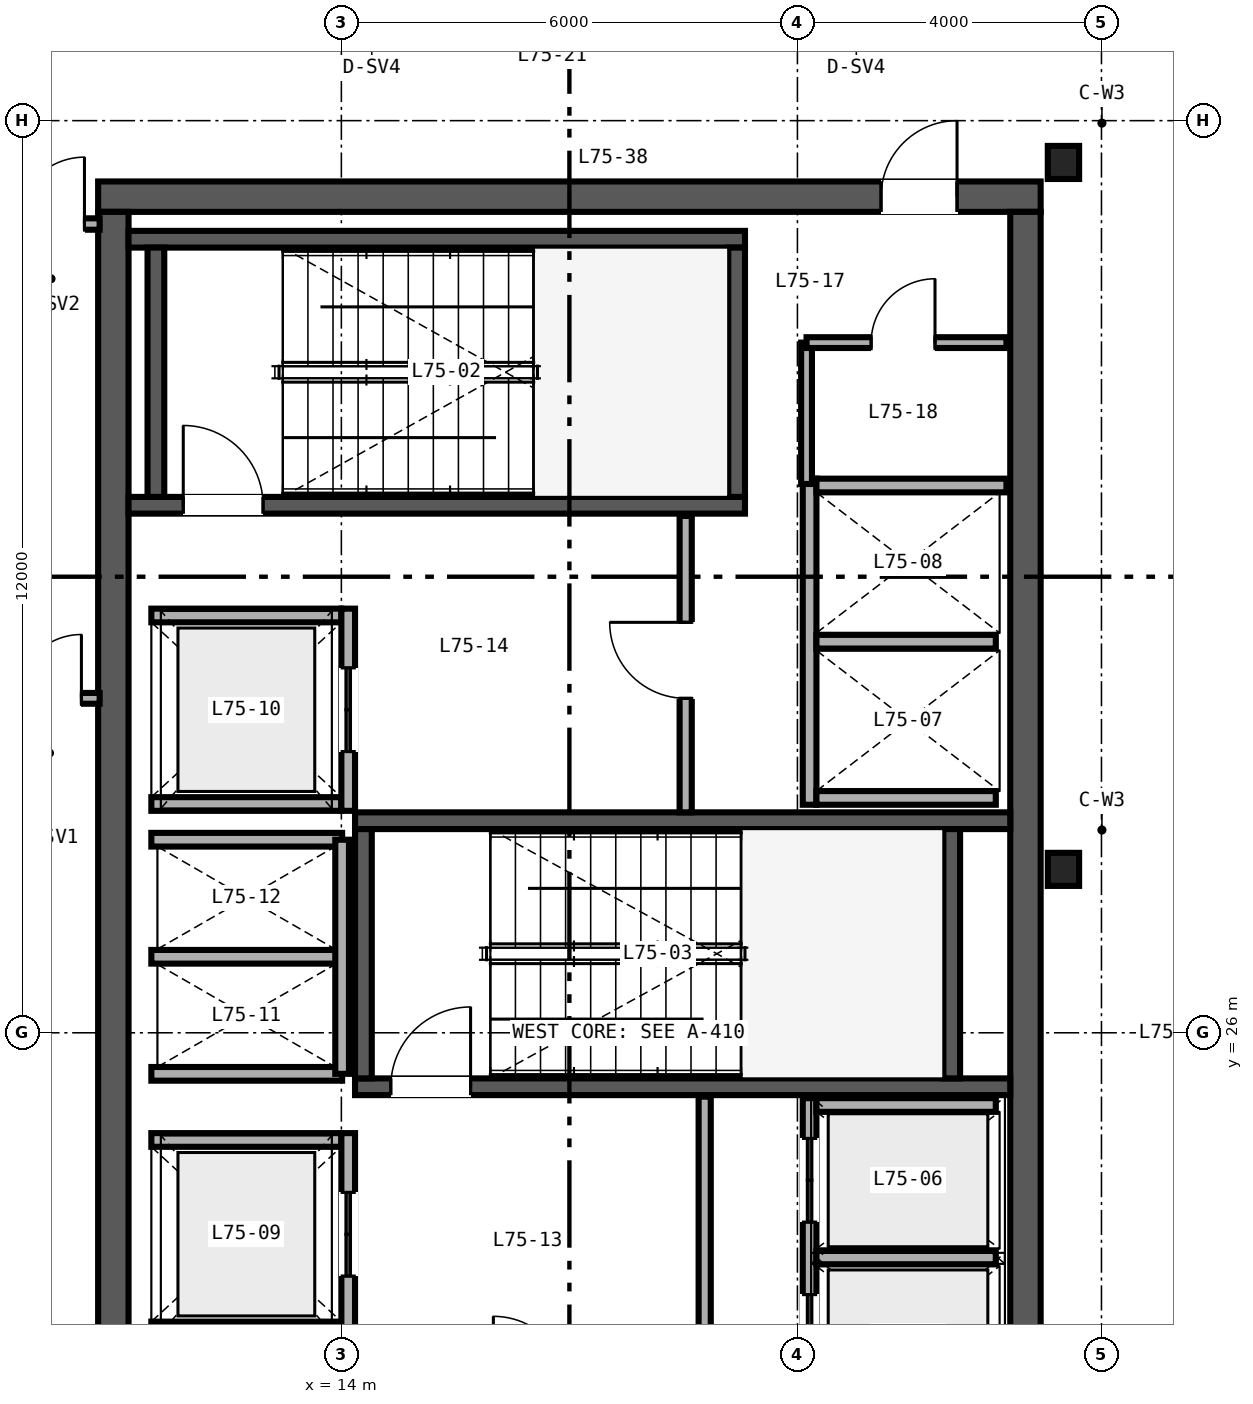
"""IFC4 building model, lengths in metres.
Left out: names, types, materials, properties, quantities, classifications, styles, units other than length and angle.
Written with IfcOpenShell. Run it as: python <this file> out.ifc"""

import sys

from ifc_helpers import new_model, si_unit, direction, frame, frame_2d, origin, origin_2d, place, context, subcontext, project, spatial, rectangle, i_section, extrude, source, transform, mapped, element, fill, save


model = new_model("IFC4")
c1 = context("Model", 3, precision=1e-05, world=origin(), true_north=direction((0.0, 1.0)))
c2 = subcontext(c1, "Body", "Model", "MODEL_VIEW")
j1 = project(units=[si_unit("LENGTHUNIT", "METRE"), si_unit("PLANEANGLEUNIT", "RADIAN")], contexts=[c1])
p1 = place(None, origin())
s1 = spatial("IfcSite", under=j1, at=p1, CompositionType="ELEMENT")
p2 = place(p1, origin())
s2 = spatial("IfcBuilding", under=s1, at=p2, CompositionType="ELEMENT")
p3 = place(p2, frame((0.0, 0.0, 294.0)))
s3 = spatial("IfcBuildingStorey", under=s2, at=p3, CompositionType="ELEMENT", Elevation=294.0)
p4 = place(p3, frame((10.8, 37.0, 0.0), z_axis=(0.0, 0.0, 1.0), x_axis=(1.0, 0.0, 0.0)))
e1 = element("IfcWall", 1, at=p4, inside=s3, PredefinedType="SHEAR", context=c2, shape_type="SweptSolid", body=[
    extrude(rectangle(XDim=12.4, YDim=0.4, at=frame_2d((6.2, 0.0))), origin(), (0.0, 0.0, 1.0), 3.38),
])
p5 = place(p4, frame((10.3, 0.0, 0.0)))
e2 = element("IfcOpeningElement", 2, at=p5, cuts=e1, PredefinedType="OPENING", context=c2, shape_type="SweptSolid", body=[
    extrude(rectangle(XDim=1.0, YDim=2.15, at=frame_2d((0.5, 1.075))), frame((0.0, 0.21, 0.0), z_axis=(0.0, -1.0, 0.0), x_axis=(1.0, 0.0, 0.0)), (0.0, 0.0, 1.0), 0.42),
])
for number, where, z_axis, x_axis in (
    (3, (11.0, 15.2, 0.0), (0.0, 0.0, 1.0), (0.0, 1.0, 0.0)),
    (4, (23.0, 15.2, 0.0), (0.0, 0.0, 1.0), (0.0, 1.0, 0.0)),
):
    element("IfcWall", number, at=place(p3, frame(where, z_axis=z_axis, x_axis=x_axis)), inside=s3, PredefinedType="SHEAR", context=c2, shape_type="SweptSolid", body=[
        extrude(rectangle(XDim=21.6, YDim=0.4, at=frame_2d((10.8, 0.0))), origin(), (0.0, 0.0, 1.0), 3.38),
    ])
p6 = place(p3, frame((11.2, 32.94, 0.0), z_axis=(0.0, 0.0, 1.0), x_axis=(1.0, 0.0, 0.0)))
e5 = element("IfcWall", 5, at=p6, inside=s3, PredefinedType="SHEAR", context=c2, shape_type="SweptSolid", body=[
    extrude(rectangle(XDim=8.11, YDim=0.22, at=frame_2d((4.055, 0.0))), origin(), (0.0, 0.0, 1.0), 3.4),
])
p7 = place(p6, frame((0.72, 0.0, 0.0)))
e6 = element("IfcOpeningElement", 6, at=p7, cuts=e5, PredefinedType="OPENING", context=c2, shape_type="SweptSolid", body=[
    extrude(rectangle(XDim=1.05, YDim=2.15, at=frame_2d((0.525, 1.075))), frame((0.0, 0.12, 0.0), z_axis=(0.0, -1.0, 0.0), x_axis=(1.0, 0.0, 0.0)), (0.0, 0.0, 1.0), 0.24),
])
p8 = place(p3, frame((11.2, 36.44, 0.0), z_axis=(0.0, 0.0, 1.0), x_axis=(1.0, 0.0, 0.0)))
e7 = element("IfcWall", 7, at=p8, inside=s3, PredefinedType="SHEAR", context=c2, shape_type="SweptSolid", body=[
    extrude(rectangle(XDim=8.11, YDim=0.22, at=frame_2d((4.055, 0.0))), origin(), (0.0, 0.0, 1.0), 3.4),
])
for number, where, z_axis, x_axis in (
    (8, (11.56, 33.05, 0.0), (0.0, 0.0, 1.0), (0.0, 1.0, 0.0)),
    (9, (19.2, 33.05, 0.0), (0.0, 0.0, 1.0), (0.0, 1.0, 0.0)),
):
    element("IfcWall", number, at=place(p3, frame(where, z_axis=z_axis, x_axis=x_axis)), inside=s3, PredefinedType="SHEAR", context=c2, shape_type="SweptSolid", body=[
        extrude(rectangle(XDim=3.28, YDim=0.22, at=frame_2d((1.64, 0.0))), origin(), (0.0, 0.0, 1.0), 3.4),
    ])
p9 = place(p3, frame((14.18, 25.29, 0.0), z_axis=(0.0, 0.0, 1.0), x_axis=(1.0, 0.0, 0.0)))
e10 = element("IfcWall", 10, at=p9, inside=s3, PredefinedType="SHEAR", context=c2, shape_type="SweptSolid", body=[
    extrude(rectangle(XDim=8.62, YDim=0.22, at=frame_2d((4.31, 0.0))), origin(), (0.0, 0.0, 1.0), 3.4),
])
p10 = place(p9, frame((0.47, 0.0, 0.0)))
e11 = element("IfcOpeningElement", 11, at=p10, cuts=e10, PredefinedType="OPENING", context=c2, shape_type="SweptSolid", body=[
    extrude(rectangle(XDim=1.05, YDim=2.15, at=frame_2d((0.525, 1.075))), frame((0.0, 0.12, 0.0), z_axis=(0.0, -1.0, 0.0), x_axis=(1.0, 0.0, 0.0)), (0.0, 0.0, 1.0), 0.24),
])
p11 = place(p3, frame((14.18, 28.79, 0.0), z_axis=(0.0, 0.0, 1.0), x_axis=(1.0, 0.0, 0.0)))
e12 = element("IfcWall", 12, at=p11, inside=s3, PredefinedType="SHEAR", context=c2, shape_type="SweptSolid", body=[
    extrude(rectangle(XDim=8.62, YDim=0.22, at=frame_2d((4.31, 0.0))), origin(), (0.0, 0.0, 1.0), 3.4),
])
for number, where, z_axis, x_axis in (
    (13, (14.29, 25.4, 0.0), (0.0, 0.0, 1.0), (0.0, 1.0, 0.0)),
    (14, (22.03, 25.4, 0.0), (0.0, 0.0, 1.0), (0.0, 1.0, 0.0)),
):
    element("IfcWall", number, at=place(p3, frame(where, z_axis=z_axis, x_axis=x_axis)), inside=s3, PredefinedType="SHEAR", context=c2, shape_type="SweptSolid", body=[
        extrude(rectangle(XDim=3.28, YDim=0.22, at=frame_2d((1.64, 0.0))), origin(), (0.0, 0.0, 1.0), 3.4),
    ])
m1 = source(origin(), c2, "Body", "SweptSolid", [
    extrude(i_section(OverallWidth=0.412, OverallDepth=0.435, WebThickness=0.036, FlangeThickness=0.057, FilletRadius=0.025, at=origin_2d()), origin(), (0.0, 0.0, 1.0), 3.38),
])
for number, where, z_axis, x_axis in (
    (15, (23.5, 28.15, 0.0), (0.0, 0.0, 1.0), (1.0, 0.0, 0.0)),
    (16, (23.5, 37.45, 0.0), (0.0, 0.0, 1.0), (1.0, 0.0, 0.0)),
):
    element("IfcColumn", number, at=place(p3, frame(where, z_axis=z_axis, x_axis=x_axis)), inside=s3, PredefinedType="COLUMN", context=c2, shape_type="MappedRepresentation", body=[
        mapped(m1, transform((0.0, 0.0, 0.0), scale=1.0)),
    ])
p12 = place(p3, frame((20.16, 18.82, 0.0), z_axis=(0.0, 0.0, 1.0), x_axis=(0.0, 1.0, 0.0)))
e17 = element("IfcWall", 17, at=p12, inside=s3, PredefinedType="SOLIDWALL", context=c2, shape_type="SweptSolid", body=[
    extrude(rectangle(XDim=6.32, YDim=0.18, at=frame_2d((3.16, 0.0))), origin(), (0.0, 0.0, 1.0), 2.48),
])
p13 = place(p12, frame((0.555, 0.0, 0.0)))
e18 = element("IfcOpeningElement", 18, at=p13, cuts=e17, PredefinedType="OPENING", context=c2, shape_type="SweptSolid", body=[
    extrude(rectangle(XDim=1.1, YDim=2.2, at=frame_2d((0.55, 1.1))), frame((0.0, 0.1, 0.0), z_axis=(0.0, -1.0, 0.0), x_axis=(1.0, 0.0, 0.0)), (0.0, 0.0, 1.0), 0.2),
])
p14 = place(p12, frame((2.635, 0.0, 0.0)))
e19 = element("IfcOpeningElement", 19, at=p14, cuts=e17, PredefinedType="OPENING", context=c2, shape_type="SweptSolid", body=[
    extrude(rectangle(XDim=1.1, YDim=2.2, at=frame_2d((0.55, 1.1))), frame((0.0, 0.1, 0.0), z_axis=(0.0, -1.0, 0.0), x_axis=(1.0, 0.0, 0.0)), (0.0, 0.0, 1.0), 0.2),
])
p15 = place(p12, frame((4.69, 0.0, 0.0)))
e20 = element("IfcOpeningElement", 20, at=p15, cuts=e17, PredefinedType="OPENING", context=c2, shape_type="SweptSolid", body=[
    extrude(rectangle(XDim=1.1, YDim=2.2, at=frame_2d((0.55, 1.1))), frame((0.0, 0.1, 0.0), z_axis=(0.0, -1.0, 0.0), x_axis=(1.0, 0.0, 0.0)), (0.0, 0.0, 1.0), 0.2),
])
for number, where, z_axis, x_axis in (
    (21, (20.25, 25.05, 0.0), (0.0, 0.0, 1.0), (1.0, 0.0, 0.0)),
    (22, (20.25, 23.045, 0.0), (0.0, 0.0, 1.0), (1.0, 0.0, 0.0)),
):
    element("IfcWall", number, at=place(p3, frame(where, z_axis=z_axis, x_axis=x_axis)), inside=s3, PredefinedType="SOLIDWALL", context=c2, shape_type="SweptSolid", body=[
        extrude(rectangle(XDim=2.36, YDim=0.18, at=frame_2d((1.18, 0.0))), origin(), (0.0, 0.0, 1.0), 3.38),
    ])
p16 = place(p3, frame((20.16, 29.0, 0.0), z_axis=(0.0, 0.0, 1.0), x_axis=(0.0, 1.0, 0.0)))
e23 = element("IfcWall", 23, at=p16, inside=s3, PredefinedType="SOLIDWALL", context=c2, shape_type="SweptSolid", body=[
    extrude(rectangle(XDim=4.29, YDim=0.18, at=frame_2d((2.145, 0.0))), origin(), (0.0, 0.0, 1.0), 3.38),
])
p17 = place(p3, frame((20.25, 29.09, 0.0), z_axis=(0.0, 0.0, 1.0), x_axis=(1.0, 0.0, 0.0)))
e24 = element("IfcWall", 24, at=p17, inside=s3, PredefinedType="SOLIDWALL", context=c2, shape_type="SweptSolid", body=[
    extrude(rectangle(XDim=2.36, YDim=0.18, at=frame_2d((1.18, 0.0))), origin(), (0.0, 0.0, 1.0), 3.38),
])
p18 = place(p3, frame((20.25, 33.2, 0.0), z_axis=(0.0, 0.0, 1.0), x_axis=(1.0, 0.0, 0.0)))
e25 = element("IfcWall", 25, at=p18, inside=s3, PredefinedType="SOLIDWALL", context=c2, shape_type="SweptSolid", body=[
    extrude(rectangle(XDim=2.5, YDim=0.18, at=frame_2d((1.25, 0.0))), origin(), (0.0, 0.0, 1.0), 3.38),
])
p19 = place(p3, frame((20.25, 31.145, 0.0), z_axis=(0.0, 0.0, 1.0), x_axis=(1.0, 0.0, 0.0)))
e26 = element("IfcWall", 26, at=p19, inside=s3, PredefinedType="SOLIDWALL", context=c2, shape_type="SweptSolid", body=[
    extrude(rectangle(XDim=2.36, YDim=0.18, at=frame_2d((1.18, 0.0))), origin(), (0.0, 0.0, 1.0), 3.38),
])
for number, where, z_axis, x_axis in (
    (27, (11.5, 22.11, 0.0), (0.0, 0.0, 1.0), (1.0, 0.0, 0.0)),
    (28, (11.5, 24.59, 0.0), (0.0, 0.0, 1.0), (1.0, 0.0, 0.0)),
):
    element("IfcWall", number, at=place(p3, frame(where, z_axis=z_axis, x_axis=x_axis)), inside=s3, PredefinedType="SOLIDWALL", context=c2, shape_type="SweptSolid", body=[
        extrude(rectangle(XDim=2.5, YDim=0.18, at=frame_2d((1.25, 0.0))), origin(), (0.0, 0.0, 1.0), 3.38),
    ])
p20 = place(p3, frame((14.09, 22.02, 0.0), z_axis=(0.0, 0.0, 1.0), x_axis=(0.0, 1.0, 0.0)))
e29 = element("IfcWall", 29, at=p20, inside=s3, PredefinedType="SOLIDWALL", context=c2, shape_type="SweptSolid", body=[
    extrude(rectangle(XDim=2.66, YDim=0.18, at=frame_2d((1.33, 0.0))), origin(), (0.0, 0.0, 1.0), 3.38),
])
p21 = place(p20, frame((0.78, 0.0, 0.0)))
e30 = element("IfcOpeningElement", 30, at=p21, cuts=e29, PredefinedType="OPENING", context=c2, shape_type="SweptSolid", body=[
    extrude(rectangle(XDim=1.1, YDim=2.2, at=frame_2d((0.55, 1.1))), frame((0.0, 0.1, 0.0), z_axis=(0.0, -1.0, 0.0), x_axis=(1.0, 0.0, 0.0)), (0.0, 0.0, 1.0), 0.2),
])
for number, where, z_axis, x_axis in (
    (31, (11.5, 29.01, 0.0), (0.0, 0.0, 1.0), (1.0, 0.0, 0.0)),
    (32, (11.5, 31.49, 0.0), (0.0, 0.0, 1.0), (1.0, 0.0, 0.0)),
):
    element("IfcWall", number, at=place(p3, frame(where, z_axis=z_axis, x_axis=x_axis)), inside=s3, PredefinedType="SOLIDWALL", context=c2, shape_type="SweptSolid", body=[
        extrude(rectangle(XDim=2.5, YDim=0.18, at=frame_2d((1.25, 0.0))), origin(), (0.0, 0.0, 1.0), 3.38),
    ])
p22 = place(p3, frame((14.09, 28.92, 0.0), z_axis=(0.0, 0.0, 1.0), x_axis=(0.0, 1.0, 0.0)))
e33 = element("IfcWall", 33, at=p22, inside=s3, PredefinedType="SOLIDWALL", context=c2, shape_type="SweptSolid", body=[
    extrude(rectangle(XDim=2.66, YDim=0.18, at=frame_2d((1.33, 0.0))), origin(), (0.0, 0.0, 1.0), 3.38),
])
p23 = place(p22, frame((0.78, 0.0, 0.0)))
e34 = element("IfcOpeningElement", 34, at=p23, cuts=e33, PredefinedType="OPENING", context=c2, shape_type="SweptSolid", body=[
    extrude(rectangle(XDim=1.1, YDim=2.2, at=frame_2d((0.55, 1.1))), frame((0.0, 0.1, 0.0), z_axis=(0.0, -1.0, 0.0), x_axis=(1.0, 0.0, 0.0)), (0.0, 0.0, 1.0), 0.2),
])
for number, where, z_axis, x_axis in (
    (35, (11.5, 25.46, 0.0), (0.0, 0.0, 1.0), (1.0, 0.0, 0.0)),
    (36, (11.5, 27.0, 0.0), (0.0, 0.0, 1.0), (1.0, 0.0, 0.0)),
    (37, (11.5, 28.54, 0.0), (0.0, 0.0, 1.0), (1.0, 0.0, 0.0)),
):
    element("IfcWall", number, at=place(p3, frame(where, z_axis=z_axis, x_axis=x_axis)), inside=s3, PredefinedType="SOLIDWALL", context=c2, shape_type="SweptSolid", body=[
        extrude(rectangle(XDim=2.51, YDim=0.18, at=frame_2d((1.255, 0.0))), origin(), (0.0, 0.0, 1.0), 3.38),
    ])
p24 = place(p3, frame((14.01, 25.46, 0.0), z_axis=(0.0, 0.0, 1.0), x_axis=(0.0, 1.0, 0.0)))
e38 = element("IfcWall", 38, at=p24, inside=s3, PredefinedType="SOLIDWALL", context=c2, shape_type="SweptSolid", body=[
    extrude(rectangle(XDim=3.08, YDim=0.18, at=frame_2d((1.54, 0.0))), origin(), (0.0, 0.0, 1.0), 3.38),
])
p25 = place(p3, frame((18.78, 21.35, 0.0), z_axis=(0.0, 0.0, 1.0), x_axis=(0.0, 1.0, 0.0)))
e39 = element("IfcWall", 39, at=p25, inside=s3, PredefinedType="PARTITIONING", context=c2, shape_type="SweptSolid", body=[
    extrude(rectangle(XDim=3.81, YDim=0.16, at=frame_2d((1.905, 0.0))), origin(), (0.0, 0.0, 1.0), 3.38),
])
p26 = place(p3, frame((18.53, 28.9, 0.0), z_axis=(0.0, 0.0, 1.0), x_axis=(0.0, 1.0, 0.0)))
e40 = element("IfcWall", 40, at=p26, inside=s3, PredefinedType="PARTITIONING", context=c2, shape_type="SweptSolid", body=[
    extrude(rectangle(XDim=3.9, YDim=0.16, at=frame_2d((1.95, 0.0))), origin(), (0.0, 0.0, 1.0), 3.38),
])
p27 = place(p26, frame((1.5, 0.0, 0.0)))
e41 = element("IfcOpeningElement", 41, at=p27, cuts=e40, PredefinedType="OPENING", context=c2, shape_type="SweptSolid", body=[
    extrude(rectangle(XDim=1.0, YDim=2.15, at=frame_2d((0.5, 1.075))), frame((0.0, 0.09, 0.0), z_axis=(0.0, -1.0, 0.0), x_axis=(1.0, 0.0, 0.0)), (0.0, 0.0, 1.0), 0.18),
])
p28 = place(p3, frame((20.12, 33.22, 0.0), z_axis=(0.0, 0.0, 1.0), x_axis=(0.0, 1.0, 0.0)))
e42 = element("IfcWall", 42, at=p28, inside=s3, PredefinedType="PARTITIONING", context=c2, shape_type="SweptSolid", body=[
    extrude(rectangle(XDim=1.86, YDim=0.142, at=frame_2d((0.93, 0.0))), origin(), (0.0, 0.0, 1.0), 3.38),
])
p29 = place(p3, frame((20.12, 35.08, 0.0), z_axis=(0.0, 0.0, 1.0), x_axis=(1.0, 0.0, 0.0)))
e43 = element("IfcWall", 43, at=p29, inside=s3, PredefinedType="PARTITIONING", context=c2, shape_type="SweptSolid", body=[
    extrude(rectangle(XDim=2.63, YDim=0.142, at=frame_2d((1.315, 0.0))), origin(), (0.0, 0.0, 1.0), 3.38),
])
p30 = place(p29, frame((0.85, 0.0, 0.0)))
e44 = element("IfcOpeningElement", 44, at=p30, cuts=e43, PredefinedType="OPENING", context=c2, shape_type="SweptSolid", body=[
    extrude(rectangle(XDim=0.84, YDim=2.1, at=frame_2d((0.42, 1.05))), frame((0.0, 0.081, 0.0), z_axis=(0.0, -1.0, 0.0), x_axis=(1.0, 0.0, 0.0)), (0.0, 0.0, 1.0), 0.162),
])
p31 = place(p3, frame((8.16, 36.64, 0.0), z_axis=(0.0, 0.0, 1.0), x_axis=(1.0, 0.0, 0.0)))
e45 = element("IfcWall", 45, at=p31, inside=s3, PredefinedType="PARTITIONING", context=c2, shape_type="SweptSolid", body=[
    extrude(rectangle(XDim=2.66, YDim=0.15, at=frame_2d((1.33, 0.0))), origin(), (0.0, 0.0, 1.0), 2.763),
])
p32 = place(p31, frame((1.58, 0.0, 0.0)))
e46 = element("IfcOpeningElement", 46, at=p32, cuts=e45, PredefinedType="OPENING", context=c2, shape_type="SweptSolid", body=[
    extrude(rectangle(XDim=0.88, YDim=2.15, at=frame_2d((0.44, 1.075))), frame((0.0, 0.085, 0.0), z_axis=(0.0, -1.0, 0.0), x_axis=(1.0, 0.0, 0.0)), (0.0, 0.0, 1.0), 0.17),
])
p33 = place(p3, frame((8.16, 30.4, 0.0), z_axis=(0.0, 0.0, 1.0), x_axis=(1.0, 0.0, 0.0)))
e47 = element("IfcWall", 47, at=p33, inside=s3, PredefinedType="PARTITIONING", context=c2, shape_type="SweptSolid", body=[
    extrude(rectangle(XDim=2.66, YDim=0.142, at=frame_2d((1.33, 0.0))), origin(), (0.0, 0.0, 1.0), 2.763),
])
p34 = place(p33, frame((1.58, 0.0, 0.0)))
e48 = element("IfcOpeningElement", 48, at=p34, cuts=e47, PredefinedType="OPENING", context=c2, shape_type="SweptSolid", body=[
    extrude(rectangle(XDim=0.84, YDim=2.1, at=frame_2d((0.42, 1.05))), frame((0.0, 0.081, 0.0), z_axis=(0.0, -1.0, 0.0), x_axis=(1.0, 0.0, 0.0)), (0.0, 0.0, 1.0), 0.162),
])
m2 = source(origin(), c2, "Body", "SweptSolid", [
    extrude(rectangle(XDim=1.05, YDim=2.15, at=frame_2d((0.525, 1.075))), frame((0.0, 0.025, 0.0), z_axis=(0.0, -1.0, 0.0), x_axis=(1.0, 0.0, 0.0)), (0.0, 0.0, 1.0), 0.05),
])
p35 = place(p7, origin())
e49 = element("IfcDoor", 49, at=p35, inside=s3, OperationType="SINGLE_SWING_LEFT", PredefinedType="DOOR", context=c2, shape_type="MappedRepresentation", body=[
    mapped(m2, transform((0.0, 0.0, 0.0), scale=1.0)),
])
fill(e6, e49)
p36 = place(p10, origin())
e50 = element("IfcDoor", 50, at=p36, inside=s3, OperationType="SINGLE_SWING_RIGHT", PredefinedType="DOOR", context=c2, shape_type="MappedRepresentation", body=[
    mapped(m2, transform((0.0, 0.0, 0.0), scale=1.0)),
])
fill(e11, e50)
m3 = source(origin(), c2, "Body", "SweptSolid", [
    extrude(rectangle(XDim=1.1, YDim=2.2, at=frame_2d((0.55, 1.1))), frame((0.0, 0.025, 0.0), z_axis=(0.0, -1.0, 0.0), x_axis=(1.0, 0.0, 0.0)), (0.0, 0.0, 1.0), 0.05),
])
p37 = place(p14, origin())
e51 = element("IfcDoor", 51, at=p37, inside=s3, OperationType="DOUBLE_DOOR_SLIDING", PredefinedType="DOOR", context=c2, shape_type="MappedRepresentation", body=[
    mapped(m3, transform((0.0, 0.0, 0.0), scale=1.0)),
])
fill(e19, e51)
p38 = place(p15, origin())
e52 = element("IfcDoor", 52, at=p38, inside=s3, OperationType="DOUBLE_DOOR_SLIDING", PredefinedType="DOOR", context=c2, shape_type="MappedRepresentation", body=[
    mapped(m3, transform((0.0, 0.0, 0.0), scale=1.0)),
])
fill(e20, e52)
p39 = place(p21, origin())
e53 = element("IfcDoor", 53, at=p39, inside=s3, OperationType="DOUBLE_DOOR_SLIDING", PredefinedType="DOOR", context=c2, shape_type="MappedRepresentation", body=[
    mapped(m3, transform((0.0, 0.0, 0.0), scale=1.0)),
])
fill(e30, e53)
p40 = place(p23, origin())
e54 = element("IfcDoor", 54, at=p40, inside=s3, OperationType="DOUBLE_DOOR_SLIDING", PredefinedType="DOOR", context=c2, shape_type="MappedRepresentation", body=[
    mapped(m3, transform((0.0, 0.0, 0.0), scale=1.0)),
])
fill(e34, e54)
m4 = source(origin(), c2, "Body", "SweptSolid", [
    extrude(rectangle(XDim=1.0, YDim=2.15, at=frame_2d((0.5, 1.075))), frame((0.0, 0.025, 0.0), z_axis=(0.0, -1.0, 0.0), x_axis=(1.0, 0.0, 0.0)), (0.0, 0.0, 1.0), 0.05),
])
p41 = place(p27, origin())
e55 = element("IfcDoor", 55, at=p41, inside=s3, OperationType="SINGLE_SWING_RIGHT", PredefinedType="DOOR", context=c2, shape_type="MappedRepresentation", body=[
    mapped(m4, transform((0.0, 0.0, 0.0), scale=1.0)),
])
fill(e41, e55)
m5 = source(origin(), c2, "Body", "SweptSolid", [
    extrude(rectangle(XDim=0.84, YDim=2.1, at=frame_2d((0.42, 1.05))), frame((0.0, 0.025, 0.0), z_axis=(0.0, -1.0, 0.0), x_axis=(1.0, 0.0, 0.0)), (0.0, 0.0, 1.0), 0.05),
])
p42 = place(p30, origin())
e56 = element("IfcDoor", 56, at=p42, inside=s3, OperationType="SINGLE_SWING_RIGHT", PredefinedType="DOOR", context=c2, shape_type="MappedRepresentation", body=[
    mapped(m5, transform((0.0, 0.0, 0.0), scale=1.0)),
])
fill(e44, e56)
p43 = place(p5, origin())
e57 = element("IfcDoor", 57, at=p43, inside=s3, OperationType="SINGLE_SWING_RIGHT", PredefinedType="DOOR", context=c2, shape_type="MappedRepresentation", body=[
    mapped(m4, transform((0.0, 0.0, 0.0), scale=1.0)),
])
fill(e2, e57)
m6 = source(origin(), c2, "Body", "SweptSolid", [
    extrude(rectangle(XDim=0.88, YDim=2.15, at=frame_2d((0.44, 1.075))), frame((0.0, 0.025, 0.0), z_axis=(0.0, -1.0, 0.0), x_axis=(1.0, 0.0, 0.0)), (0.0, 0.0, 1.0), 0.05),
])
p44 = place(p32, origin())
e58 = element("IfcDoor", 58, at=p44, inside=s3, OperationType="SINGLE_SWING_RIGHT", PredefinedType="DOOR", context=c2, shape_type="MappedRepresentation", body=[
    mapped(m6, transform((0.0, 0.0, 0.0), scale=1.0)),
])
fill(e46, e58)
p45 = place(p34, origin())
e59 = element("IfcDoor", 59, at=p45, inside=s3, OperationType="SINGLE_SWING_RIGHT", PredefinedType="DOOR", context=c2, shape_type="MappedRepresentation", body=[
    mapped(m5, transform((0.0, 0.0, 0.0), scale=1.0)),
])
fill(e48, e59)
save(model, sys.argv[1])
